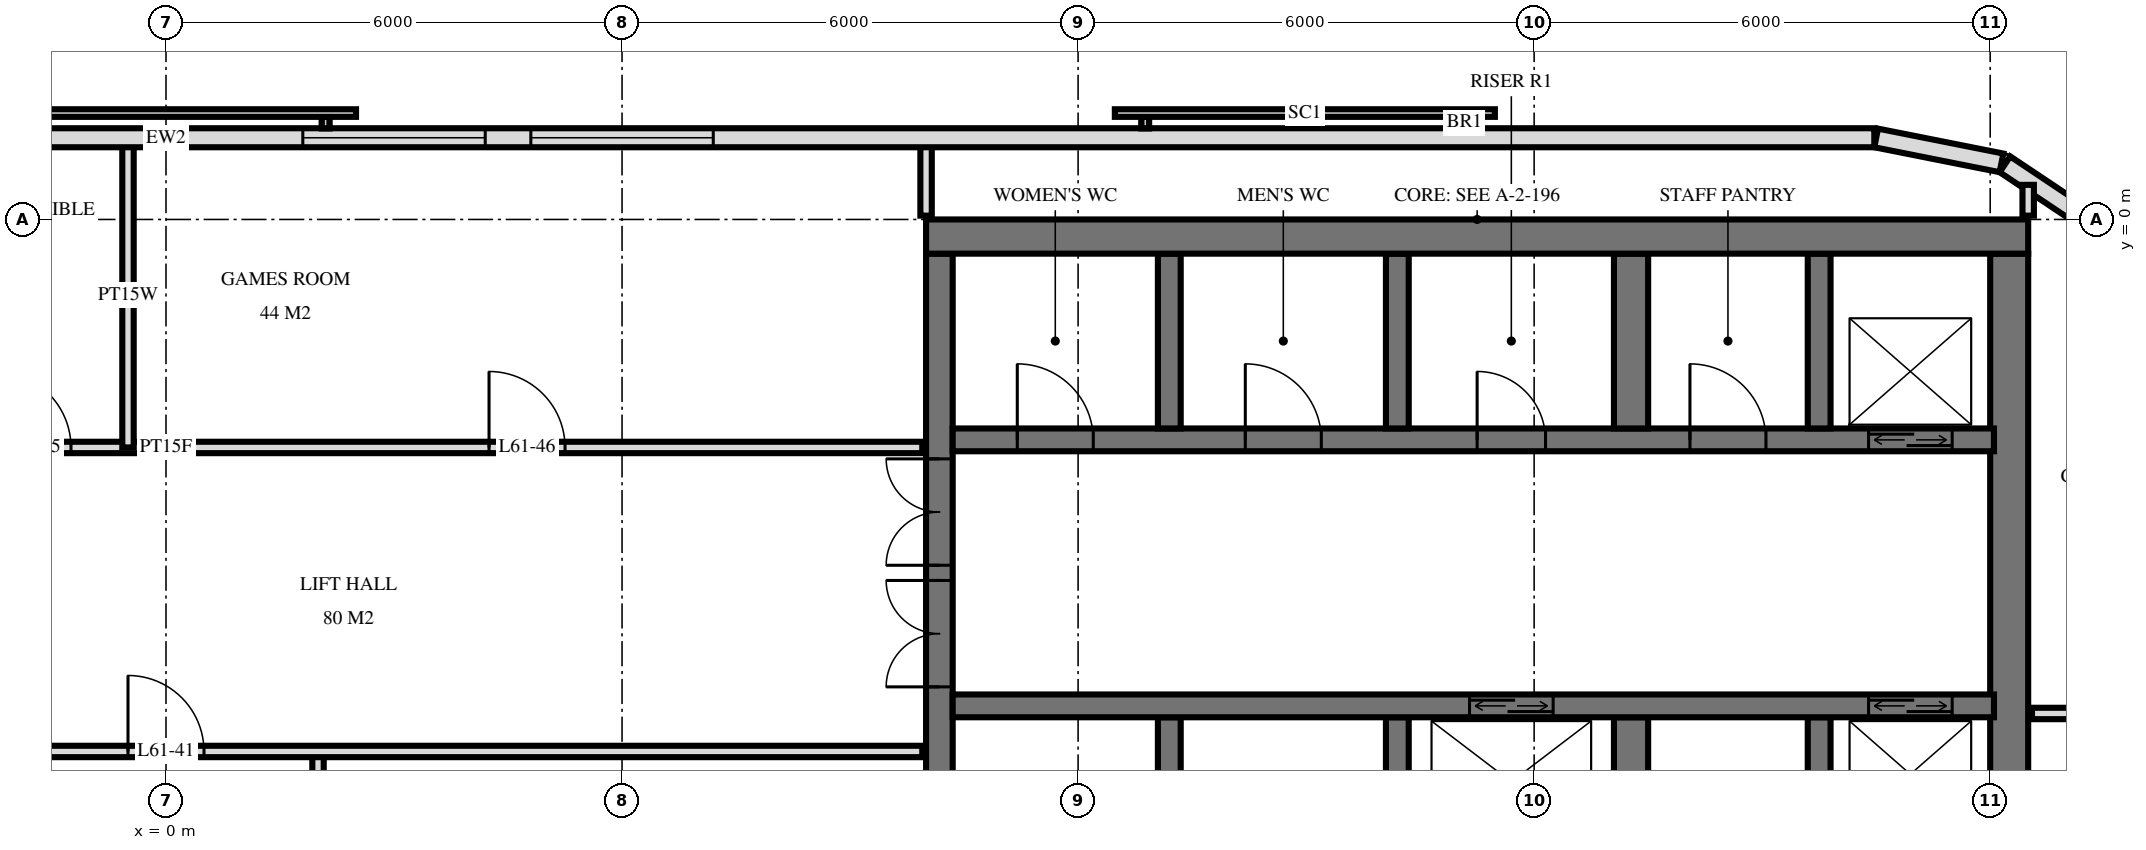
"""IFC4 building model, lengths in metres.
Left out: names, types, materials, properties, quantities, classifications, styles, units other than length and angle.
Written with IfcOpenShell. Run it as: python <this file> out.ifc"""

import sys

from ifc_helpers import new_model, si_unit, direction, frame, frame_2d, origin, place, context, subcontext, project, spatial, rectangle, extrude, element, fill, save


model = new_model("IFC4")
c1 = context("Model", 3, precision=1e-05, world=origin(), true_north=direction((0.0, 1.0)))
c2 = subcontext(c1, "Body", "Model", "MODEL_VIEW")
j1 = project(units=[si_unit("LENGTHUNIT", "METRE"), si_unit("PLANEANGLEUNIT", "RADIAN")], contexts=[c1])
p1 = place(None, origin())
s1 = spatial("IfcSite", under=j1, at=p1, CompositionType="ELEMENT")
p2 = place(p1, origin())
s2 = spatial("IfcBuilding", under=s1, at=p2, CompositionType="ELEMENT")
p3 = place(p2, frame((0.0, 0.0, 232.6)))
s3 = spatial("IfcBuildingStorey", under=s2, at=p3, CompositionType="ELEMENT", Elevation=232.6)
p4 = place(p3, frame((10.0, -0.225, 0.0), z_axis=(0.0, 0.0, 1.0), x_axis=(1.0, 0.0, 0.0)))
e1 = element("IfcWall", 1, at=p4, inside=s3, PredefinedType="SHEAR", context=c2, shape_type="SweptSolid", body=[
    extrude(rectangle(XDim=14.5, YDim=0.45, at=frame_2d((7.25, 0.0))), origin(), (0.0, 0.0, 1.0), 3.5),
])
p5 = place(p3, frame((10.175, -14.55, 0.0), z_axis=(0.0, 0.0, 1.0), x_axis=(0.0, 1.0, 0.0)))
e2 = element("IfcWall", 2, at=p5, inside=s3, PredefinedType="SHEAR", context=c2, shape_type="SweptSolid", body=[
    extrude(rectangle(XDim=14.1, YDim=0.35, at=frame_2d((7.05, 0.0))), origin(), (0.0, 0.0, 1.0), 3.5),
])
p6 = place(p5, frame((8.4, 0.0, 0.0)))
e3 = element("IfcOpeningElement", 3, at=p6, cuts=e2, PredefinedType="OPENING", context=c2, shape_type="SweptSolid", body=[
    extrude(rectangle(XDim=1.4, YDim=2.4, at=frame_2d((0.7, 1.2))), frame((0.0, 0.185, 0.0), z_axis=(0.0, -1.0, 0.0), x_axis=(1.0, 0.0, 0.0)), (0.0, 0.0, 1.0), 0.37),
])
p7 = place(p5, frame((10.0, 0.0, 0.0)))
e4 = element("IfcOpeningElement", 4, at=p7, cuts=e2, PredefinedType="OPENING", context=c2, shape_type="SweptSolid", body=[
    extrude(rectangle(XDim=1.4, YDim=2.4, at=frame_2d((0.7, 1.2))), frame((0.0, 0.185, 0.0), z_axis=(0.0, -1.0, 0.0), x_axis=(1.0, 0.0, 0.0)), (0.0, 0.0, 1.0), 0.37),
])
p8 = place(p5, frame((4.0, 0.0, 0.0)))
e5 = element("IfcOpeningElement", 5, at=p8, cuts=e2, PredefinedType="OPENING", context=c2, shape_type="SweptSolid", body=[
    extrude(rectangle(XDim=1.2, YDim=2.1, at=frame_2d((0.6, 1.05))), frame((0.0, 0.185, 0.0), z_axis=(0.0, -1.0, 0.0), x_axis=(1.0, 0.0, 0.0)), (0.0, 0.0, 1.0), 0.37),
])
p9 = place(p3, frame((24.25, -14.55, 0.0), z_axis=(0.0, 0.0, 1.0), x_axis=(0.0, 1.0, 0.0)))
e6 = element("IfcWall", 6, at=p9, inside=s3, PredefinedType="SHEAR", context=c2, shape_type="SweptSolid", body=[
    extrude(rectangle(XDim=14.1, YDim=0.5, at=frame_2d((7.05, 0.0))), origin(), (0.0, 0.0, 1.0), 3.5),
])
p10 = place(p3, frame((10.35, -2.9, 0.0), z_axis=(0.0, 0.0, 1.0), x_axis=(1.0, 0.0, 0.0)))
e7 = element("IfcWall", 7, at=p10, inside=s3, PredefinedType="SHEAR", context=c2, shape_type="SweptSolid", body=[
    extrude(rectangle(XDim=13.7, YDim=0.3, at=frame_2d((6.85, 0.0))), origin(), (0.0, 0.0, 1.0), 3.5),
])
p11 = place(p10, frame((12.05, 0.0, 0.0)))
e8 = element("IfcOpeningElement", 8, at=p11, cuts=e7, PredefinedType="OPENING", context=c2, shape_type="SweptSolid", body=[
    extrude(rectangle(XDim=1.1, YDim=2.1, at=frame_2d((0.55, 1.05))), frame((0.0, 0.16, 0.0), z_axis=(0.0, -1.0, 0.0), x_axis=(1.0, 0.0, 0.0)), (0.0, 0.0, 1.0), 0.32),
])
p12 = place(p10, frame((6.9, 0.0, 0.0)))
e9 = element("IfcOpeningElement", 9, at=p12, cuts=e7, PredefinedType="OPENING", context=c2, shape_type="SweptSolid", body=[
    extrude(rectangle(XDim=0.9, YDim=2.1, at=frame_2d((0.45, 1.05))), frame((0.0, 0.16, 0.0), z_axis=(0.0, -1.0, 0.0), x_axis=(1.0, 0.0, 0.0)), (0.0, 0.0, 1.0), 0.32),
])
p13 = place(p10, frame((0.85, 0.0, 0.0)))
e10 = element("IfcOpeningElement", 10, at=p13, cuts=e7, PredefinedType="OPENING", context=c2, shape_type="SweptSolid", body=[
    extrude(rectangle(XDim=1.0, YDim=2.1, at=frame_2d((0.5, 1.05))), frame((0.0, 0.16, 0.0), z_axis=(0.0, -1.0, 0.0), x_axis=(1.0, 0.0, 0.0)), (0.0, 0.0, 1.0), 0.32),
])
p14 = place(p10, frame((3.85, 0.0, 0.0)))
e11 = element("IfcOpeningElement", 11, at=p14, cuts=e7, PredefinedType="OPENING", context=c2, shape_type="SweptSolid", body=[
    extrude(rectangle(XDim=1.0, YDim=2.1, at=frame_2d((0.5, 1.05))), frame((0.0, 0.16, 0.0), z_axis=(0.0, -1.0, 0.0), x_axis=(1.0, 0.0, 0.0)), (0.0, 0.0, 1.0), 0.32),
])
p15 = place(p10, frame((9.7, 0.0, 0.0)))
e12 = element("IfcOpeningElement", 12, at=p15, cuts=e7, PredefinedType="OPENING", context=c2, shape_type="SweptSolid", body=[
    extrude(rectangle(XDim=1.0, YDim=2.1, at=frame_2d((0.5, 1.05))), frame((0.0, 0.16, 0.0), z_axis=(0.0, -1.0, 0.0), x_axis=(1.0, 0.0, 0.0)), (0.0, 0.0, 1.0), 0.32),
])
p16 = place(p3, frame((10.35, -6.4, 0.0), z_axis=(0.0, 0.0, 1.0), x_axis=(1.0, 0.0, 0.0)))
e13 = element("IfcWall", 13, at=p16, inside=s3, PredefinedType="SHEAR", context=c2, shape_type="SweptSolid", body=[
    extrude(rectangle(XDim=13.7, YDim=0.3, at=frame_2d((6.85, 0.0))), origin(), (0.0, 0.0, 1.0), 3.5),
])
p17 = place(p16, frame((12.05, 0.0, 0.0)))
e14 = element("IfcOpeningElement", 14, at=p17, cuts=e13, PredefinedType="OPENING", context=c2, shape_type="SweptSolid", body=[
    extrude(rectangle(XDim=1.1, YDim=2.1, at=frame_2d((0.55, 1.05))), frame((0.0, 0.16, 0.0), z_axis=(0.0, -1.0, 0.0), x_axis=(1.0, 0.0, 0.0)), (0.0, 0.0, 1.0), 0.32),
])
p18 = place(p16, frame((6.8, 0.0, 0.0)))
e15 = element("IfcOpeningElement", 15, at=p18, cuts=e13, PredefinedType="OPENING", context=c2, shape_type="SweptSolid", body=[
    extrude(rectangle(XDim=1.1, YDim=2.1, at=frame_2d((0.55, 1.05))), frame((0.0, 0.16, 0.0), z_axis=(0.0, -1.0, 0.0), x_axis=(1.0, 0.0, 0.0)), (0.0, 0.0, 1.0), 0.32),
])
for number, where, z_axis, x_axis in (
    (16, (13.2, -2.75, 0.0), (0.0, 0.0, 1.0), (0.0, 1.0, 0.0)),
    (17, (13.2, -8.85, 0.0), (0.0, 0.0, 1.0), (0.0, 1.0, 0.0)),
    (18, (16.2, -2.75, 0.0), (0.0, 0.0, 1.0), (0.0, 1.0, 0.0)),
    (19, (16.2, -8.85, 0.0), (0.0, 0.0, 1.0), (0.0, 1.0, 0.0)),
):
    element("IfcWall", number, at=place(p3, frame(where, z_axis=z_axis, x_axis=x_axis)), inside=s3, PredefinedType="SHEAR", context=c2, shape_type="SweptSolid", body=[
        extrude(rectangle(XDim=2.3, YDim=0.3, at=frame_2d((1.15, 0.0))), origin(), (0.0, 0.0, 1.0), 3.5),
    ])
for number, where, z_axis, x_axis in (
    (20, (19.275, -2.75, 0.0), (0.0, 0.0, 1.0), (0.0, 1.0, 0.0)),
    (21, (19.275, -8.85, 0.0), (0.0, 0.0, 1.0), (0.0, 1.0, 0.0)),
):
    element("IfcWall", number, at=place(p3, frame(where, z_axis=z_axis, x_axis=x_axis)), inside=s3, PredefinedType="SHEAR", context=c2, shape_type="SweptSolid", body=[
        extrude(rectangle(XDim=2.3, YDim=0.45, at=frame_2d((1.15, 0.0))), origin(), (0.0, 0.0, 1.0), 3.5),
    ])
for number, where, z_axis, x_axis in (
    (22, (21.75, -2.75, 0.0), (0.0, 0.0, 1.0), (0.0, 1.0, 0.0)),
    (23, (21.75, -8.85, 0.0), (0.0, 0.0, 1.0), (0.0, 1.0, 0.0)),
):
    element("IfcWall", number, at=place(p3, frame(where, z_axis=z_axis, x_axis=x_axis)), inside=s3, PredefinedType="SHEAR", context=c2, shape_type="SweptSolid", body=[
        extrude(rectangle(XDim=2.3, YDim=0.3, at=frame_2d((1.15, 0.0))), origin(), (0.0, 0.0, 1.0), 3.5),
    ])
p19 = place(p3, frame((25.571, -0.194, 0.0), z_axis=(0.0, 0.0, 1.0), x_axis=(-0.831482937015, 0.55555029066, 0.0)))
e24 = element("IfcWall", 24, at=p19, inside=s3, PredefinedType="SOLIDWALL", context=c2, shape_type="SweptSolid", body=[
    extrude(rectangle(XDim=1.656, YDim=0.25, at=frame_2d((0.828, 0.0))), origin(), (0.0, 0.0, 1.0), 3.22),
])
p20 = place(p3, frame((24.149, 0.745, 0.0), z_axis=(0.0, 0.0, 1.0), x_axis=(-0.980803419081, 0.194999110559, 0.0)))
e25 = element("IfcWall", 25, at=p20, inside=s3, PredefinedType="SOLIDWALL", context=c2, shape_type="SweptSolid", body=[
    extrude(rectangle(XDim=1.681, YDim=0.25, at=frame_2d((0.841, 0.0))), origin(), (0.0, 0.0, 1.0), 3.22),
])
p21 = place(p3, frame((22.475, 1.075, 0.0), z_axis=(0.0, 0.0, 1.0), x_axis=(-1.0, 0.0, 0.0)))
e26 = element("IfcWall", 26, at=p21, inside=s3, PredefinedType="SOLIDWALL", context=c2, shape_type="SweptSolid", body=[
    extrude(rectangle(XDim=44.951, YDim=0.25, at=frame_2d((22.475, 0.0))), origin(), (0.0, 0.0, 1.0), 3.22),
])
p22 = place(p21, frame((15.275, 0.0, 0.9)))
e27 = element("IfcOpeningElement", 27, at=p22, cuts=e26, PredefinedType="OPENING", context=c2, shape_type="SweptSolid", body=[
    extrude(rectangle(XDim=2.4, YDim=1.5, at=frame_2d((1.2, 0.75))), frame((0.0, 0.135, 0.0), z_axis=(0.0, -1.0, 0.0), x_axis=(1.0, 0.0, 0.0)), (0.0, 0.0, 1.0), 0.27),
])
p23 = place(p21, frame((18.275, 0.0, 0.9)))
e28 = element("IfcOpeningElement", 28, at=p23, cuts=e26, PredefinedType="OPENING", context=c2, shape_type="SweptSolid", body=[
    extrude(rectangle(XDim=2.4, YDim=1.5, at=frame_2d((1.2, 0.75))), frame((0.0, 0.135, 0.0), z_axis=(0.0, -1.0, 0.0), x_axis=(1.0, 0.0, 0.0)), (0.0, 0.0, 1.0), 0.27),
])
p24 = place(p21, frame((29.275, 0.0, 0.9)))
e29 = element("IfcOpeningElement", 29, at=p24, cuts=e26, PredefinedType="OPENING", context=c2, shape_type="SweptSolid", body=[
    extrude(rectangle(XDim=2.4, YDim=1.5, at=frame_2d((1.2, 0.75))), frame((0.0, 0.135, 0.0), z_axis=(0.0, -1.0, 0.0), x_axis=(1.0, 0.0, 0.0)), (0.0, 0.0, 1.0), 0.27),
])
p25 = place(p3, frame((24.5, 0.05, 0.0), z_axis=(0.0, 0.0, 1.0), x_axis=(0.0, 1.0, 0.0)))
e30 = element("IfcWall", 30, at=p25, inside=s3, PredefinedType="PARTITIONING", context=c2, shape_type="SweptSolid", body=[
    extrude(rectangle(XDim=0.405, YDim=0.15, at=frame_2d((0.203, 0.0))), origin(), (0.0, 0.0, 1.0), 3.22),
])
p26 = place(p3, frame((10.0, 0.05, 0.0), z_axis=(0.0, 0.0, 1.0), x_axis=(0.0, 1.0, 0.0)))
e31 = element("IfcWall", 31, at=p26, inside=s3, PredefinedType="PARTITIONING", context=c2, shape_type="SweptSolid", body=[
    extrude(rectangle(XDim=0.97, YDim=0.15, at=frame_2d((0.485, 0.0))), origin(), (0.0, 0.0, 1.0), 3.22),
])
p27 = place(p3, frame((2.0, -11.0, 0.0), z_axis=(0.0, 0.0, 1.0), x_axis=(0.0, 1.0, 0.0)))
e32 = element("IfcWall", 32, at=p27, inside=s3, PredefinedType="PARTITIONING", context=c2, shape_type="SweptSolid", body=[
    extrude(rectangle(XDim=4.0, YDim=0.15, at=frame_2d((2.0, 0.0))), origin(), (0.0, 0.0, 1.0), 3.22),
])
p28 = place(p3, frame((-0.5, -3.0, 0.0), z_axis=(0.0, 0.0, 1.0), x_axis=(0.0, 1.0, 0.0)))
e33 = element("IfcWall", 33, at=p28, inside=s3, PredefinedType="PLUMBINGWALL", context=c2, shape_type="SweptSolid", body=[
    extrude(rectangle(XDim=4.02, YDim=0.15, at=frame_2d((2.01, 0.0))), origin(), (0.0, 0.0, 1.0), 3.22),
])
p29 = place(p3, frame((-9.95, -7.0, 0.0), z_axis=(0.0, 0.0, 1.0), x_axis=(1.0, 0.0, 0.0)))
e34 = element("IfcWall", 34, at=p29, inside=s3, PredefinedType="PARTITIONING", context=c2, shape_type="SweptSolid", body=[
    extrude(rectangle(XDim=19.9, YDim=0.15, at=frame_2d((9.95, 0.0))), origin(), (0.0, 0.0, 1.0), 3.22),
])
p30 = place(p29, frame((9.45, 0.0, 0.0)))
e35 = element("IfcOpeningElement", 35, at=p30, cuts=e34, PredefinedType="OPENING", context=c2, shape_type="SweptSolid", body=[
    extrude(rectangle(XDim=1.0, YDim=2.1, at=frame_2d((0.5, 1.05))), frame((0.0, 0.085, 0.0), z_axis=(0.0, -1.0, 0.0), x_axis=(1.0, 0.0, 0.0)), (0.0, 0.0, 1.0), 0.17),
])
p31 = place(p29, frame((3.45, 0.0, 0.0)))
e36 = element("IfcOpeningElement", 36, at=p31, cuts=e34, PredefinedType="OPENING", context=c2, shape_type="SweptSolid", body=[
    extrude(rectangle(XDim=1.0, YDim=2.1, at=frame_2d((0.5, 1.05))), frame((0.0, 0.085, 0.0), z_axis=(0.0, -1.0, 0.0), x_axis=(1.0, 0.0, 0.0)), (0.0, 0.0, 1.0), 0.17),
])
p32 = place(p3, frame((24.55, -6.5, 0.0), z_axis=(0.0, 0.0, 1.0), x_axis=(1.0, 0.0, 0.0)))
e37 = element("IfcWall", 37, at=p32, inside=s3, PredefinedType="PLUMBINGWALL", context=c2, shape_type="SweptSolid", body=[
    extrude(rectangle(XDim=2.27, YDim=0.15, at=frame_2d((1.135, 0.0))), origin(), (0.0, 0.0, 1.0), 3.22),
])
p33 = place(p32, frame((0.75, 0.0, 0.0)))
e38 = element("IfcOpeningElement", 38, at=p33, cuts=e37, PredefinedType="OPENING", context=c2, shape_type="SweptSolid", body=[
    extrude(rectangle(XDim=0.9, YDim=2.1, at=frame_2d((0.45, 1.05))), frame((0.0, 0.085, 0.0), z_axis=(0.0, -1.0, 0.0), x_axis=(1.0, 0.0, 0.0)), (0.0, 0.0, 1.0), 0.17),
])
p34 = place(p3, frame((-9.95, -3.0, 0.0), z_axis=(0.0, 0.0, 1.0), x_axis=(1.0, 0.0, 0.0)))
e39 = element("IfcWall", 39, at=p34, inside=s3, PredefinedType="PARTITIONING", context=c2, shape_type="SweptSolid", body=[
    extrude(rectangle(XDim=19.9, YDim=0.15, at=frame_2d((9.95, 0.0))), origin(), (0.0, 0.0, 1.0), 3.22),
])
p35 = place(p34, frame((1.45, 0.0, 0.0)))
e40 = element("IfcOpeningElement", 40, at=p35, cuts=e39, PredefinedType="OPENING", context=c2, shape_type="SweptSolid", body=[
    extrude(rectangle(XDim=1.0, YDim=2.1, at=frame_2d((0.5, 1.05))), frame((0.0, 0.085, 0.0), z_axis=(0.0, -1.0, 0.0), x_axis=(1.0, 0.0, 0.0)), (0.0, 0.0, 1.0), 0.17),
])
p36 = place(p34, frame((4.95, 0.0, 0.0)))
e41 = element("IfcOpeningElement", 41, at=p36, cuts=e39, PredefinedType="OPENING", context=c2, shape_type="SweptSolid", body=[
    extrude(rectangle(XDim=1.0, YDim=2.1, at=frame_2d((0.5, 1.05))), frame((0.0, 0.085, 0.0), z_axis=(0.0, -1.0, 0.0), x_axis=(1.0, 0.0, 0.0)), (0.0, 0.0, 1.0), 0.17),
])
p37 = place(p34, frame((7.7, 0.0, 0.0)))
e42 = element("IfcOpeningElement", 42, at=p37, cuts=e39, PredefinedType="OPENING", context=c2, shape_type="SweptSolid", body=[
    extrude(rectangle(XDim=1.0, YDim=2.1, at=frame_2d((0.5, 1.05))), frame((0.0, 0.085, 0.0), z_axis=(0.0, -1.0, 0.0), x_axis=(1.0, 0.0, 0.0)), (0.0, 0.0, 1.0), 0.17),
])
p38 = place(p34, frame((14.2, 0.0, 0.0)))
e43 = element("IfcOpeningElement", 43, at=p38, cuts=e39, PredefinedType="OPENING", context=c2, shape_type="SweptSolid", body=[
    extrude(rectangle(XDim=1.0, YDim=2.1, at=frame_2d((0.5, 1.05))), frame((0.0, 0.085, 0.0), z_axis=(0.0, -1.0, 0.0), x_axis=(1.0, 0.0, 0.0)), (0.0, 0.0, 1.0), 0.17),
])
p39 = place(p22, origin())
e44 = element("IfcWindow", 44, at=p39, inside=s3, PartitioningType="SINGLE_PANEL", PredefinedType="WINDOW", context=c2, shape_type="SweptSolid", body=[
    extrude(rectangle(XDim=2.4, YDim=1.5, at=frame_2d((1.2, 0.75))), frame((0.0, 0.03, 0.0), z_axis=(0.0, -1.0, 0.0), x_axis=(1.0, 0.0, 0.0)), (0.0, 0.0, 1.0), 0.06),
])
fill(e27, e44)
p40 = place(p23, origin())
e45 = element("IfcWindow", 45, at=p40, inside=s3, PartitioningType="SINGLE_PANEL", PredefinedType="WINDOW", context=c2, shape_type="SweptSolid", body=[
    extrude(rectangle(XDim=2.4, YDim=1.5, at=frame_2d((1.2, 0.75))), frame((0.0, 0.03, 0.0), z_axis=(0.0, -1.0, 0.0), x_axis=(1.0, 0.0, 0.0)), (0.0, 0.0, 1.0), 0.06),
])
fill(e28, e45)
p41 = place(p11, origin())
e46 = element("IfcDoor", 46, at=p41, inside=s3, OperationType="DOUBLE_DOOR_SLIDING", PredefinedType="USERDEFINED", context=c2, shape_type="SweptSolid", body=[
    extrude(rectangle(XDim=1.1, YDim=2.1, at=frame_2d((0.55, 1.05))), frame((0.0, 0.025, 0.0), z_axis=(0.0, -1.0, 0.0), x_axis=(1.0, 0.0, 0.0)), (0.0, 0.0, 1.0), 0.05),
])
fill(e8, e46)
p42 = place(p17, origin())
e47 = element("IfcDoor", 47, at=p42, inside=s3, OperationType="DOUBLE_DOOR_SLIDING", PredefinedType="USERDEFINED", context=c2, shape_type="SweptSolid", body=[
    extrude(rectangle(XDim=1.1, YDim=2.1, at=frame_2d((0.55, 1.05))), frame((0.0, 0.025, 0.0), z_axis=(0.0, -1.0, 0.0), x_axis=(1.0, 0.0, 0.0)), (0.0, 0.0, 1.0), 0.05),
])
fill(e14, e47)
p43 = place(p18, origin())
e48 = element("IfcDoor", 48, at=p43, inside=s3, OperationType="DOUBLE_DOOR_SLIDING", PredefinedType="USERDEFINED", context=c2, shape_type="SweptSolid", body=[
    extrude(rectangle(XDim=1.1, YDim=2.1, at=frame_2d((0.55, 1.05))), frame((0.0, 0.025, 0.0), z_axis=(0.0, -1.0, 0.0), x_axis=(1.0, 0.0, 0.0)), (0.0, 0.0, 1.0), 0.05),
])
fill(e15, e48)
p44 = place(p6, origin())
e49 = element("IfcDoor", 49, at=p44, inside=s3, OperationType="DOUBLE_DOOR_SINGLE_SWING", PredefinedType="DOOR", context=c2, shape_type="SweptSolid", body=[
    extrude(rectangle(XDim=1.4, YDim=2.4, at=frame_2d((0.7, 1.2))), frame((0.0, 0.025, 0.0), z_axis=(0.0, -1.0, 0.0), x_axis=(1.0, 0.0, 0.0)), (0.0, 0.0, 1.0), 0.05),
])
fill(e3, e49)
p45 = place(p7, origin())
e50 = element("IfcDoor", 50, at=p45, inside=s3, OperationType="DOUBLE_DOOR_SINGLE_SWING", PredefinedType="DOOR", context=c2, shape_type="SweptSolid", body=[
    extrude(rectangle(XDim=1.4, YDim=2.4, at=frame_2d((0.7, 1.2))), frame((0.0, 0.025, 0.0), z_axis=(0.0, -1.0, 0.0), x_axis=(1.0, 0.0, 0.0)), (0.0, 0.0, 1.0), 0.05),
])
fill(e4, e50)
p46 = place(p12, origin())
e51 = element("IfcDoor", 51, at=p46, inside=s3, OperationType="SINGLE_SWING_RIGHT", PredefinedType="DOOR", context=c2, shape_type="SweptSolid", body=[
    extrude(rectangle(XDim=0.9, YDim=2.1, at=frame_2d((0.45, 1.05))), frame((0.0, 0.025, 0.0), z_axis=(0.0, -1.0, 0.0), x_axis=(1.0, 0.0, 0.0)), (0.0, 0.0, 1.0), 0.05),
])
fill(e9, e51)
p47 = place(p13, origin())
e52 = element("IfcDoor", 52, at=p47, inside=s3, OperationType="SINGLE_SWING_RIGHT", PredefinedType="DOOR", context=c2, shape_type="SweptSolid", body=[
    extrude(rectangle(XDim=1.0, YDim=2.1, at=frame_2d((0.5, 1.05))), frame((0.0, 0.025, 0.0), z_axis=(0.0, -1.0, 0.0), x_axis=(1.0, 0.0, 0.0)), (0.0, 0.0, 1.0), 0.05),
])
fill(e10, e52)
p48 = place(p14, origin())
e53 = element("IfcDoor", 53, at=p48, inside=s3, OperationType="SINGLE_SWING_RIGHT", PredefinedType="DOOR", context=c2, shape_type="SweptSolid", body=[
    extrude(rectangle(XDim=1.0, YDim=2.1, at=frame_2d((0.5, 1.05))), frame((0.0, 0.025, 0.0), z_axis=(0.0, -1.0, 0.0), x_axis=(1.0, 0.0, 0.0)), (0.0, 0.0, 1.0), 0.05),
])
fill(e11, e53)
p49 = place(p15, origin())
e54 = element("IfcDoor", 54, at=p49, inside=s3, OperationType="SINGLE_SWING_RIGHT", PredefinedType="DOOR", context=c2, shape_type="SweptSolid", body=[
    extrude(rectangle(XDim=1.0, YDim=2.1, at=frame_2d((0.5, 1.05))), frame((0.0, 0.025, 0.0), z_axis=(0.0, -1.0, 0.0), x_axis=(1.0, 0.0, 0.0)), (0.0, 0.0, 1.0), 0.05),
])
fill(e12, e54)
p50 = place(p30, origin())
e55 = element("IfcDoor", 55, at=p50, inside=s3, OperationType="SINGLE_SWING_RIGHT", PredefinedType="DOOR", context=c2, shape_type="SweptSolid", body=[
    extrude(rectangle(XDim=1.0, YDim=2.1, at=frame_2d((0.5, 1.05))), frame((0.0, 0.025, 0.0), z_axis=(0.0, -1.0, 0.0), x_axis=(1.0, 0.0, 0.0)), (0.0, 0.0, 1.0), 0.05),
])
fill(e35, e55)
p51 = place(p37, origin())
e56 = element("IfcDoor", 56, at=p51, inside=s3, OperationType="SINGLE_SWING_RIGHT", PredefinedType="DOOR", context=c2, shape_type="SweptSolid", body=[
    extrude(rectangle(XDim=1.0, YDim=2.1, at=frame_2d((0.5, 1.05))), frame((0.0, 0.025, 0.0), z_axis=(0.0, -1.0, 0.0), x_axis=(1.0, 0.0, 0.0)), (0.0, 0.0, 1.0), 0.05),
])
fill(e42, e56)
p52 = place(p38, origin())
e57 = element("IfcDoor", 57, at=p52, inside=s3, OperationType="SINGLE_SWING_RIGHT", PredefinedType="DOOR", context=c2, shape_type="SweptSolid", body=[
    extrude(rectangle(XDim=1.0, YDim=2.1, at=frame_2d((0.5, 1.05))), frame((0.0, 0.025, 0.0), z_axis=(0.0, -1.0, 0.0), x_axis=(1.0, 0.0, 0.0)), (0.0, 0.0, 1.0), 0.05),
])
fill(e43, e57)
save(model, sys.argv[1])
